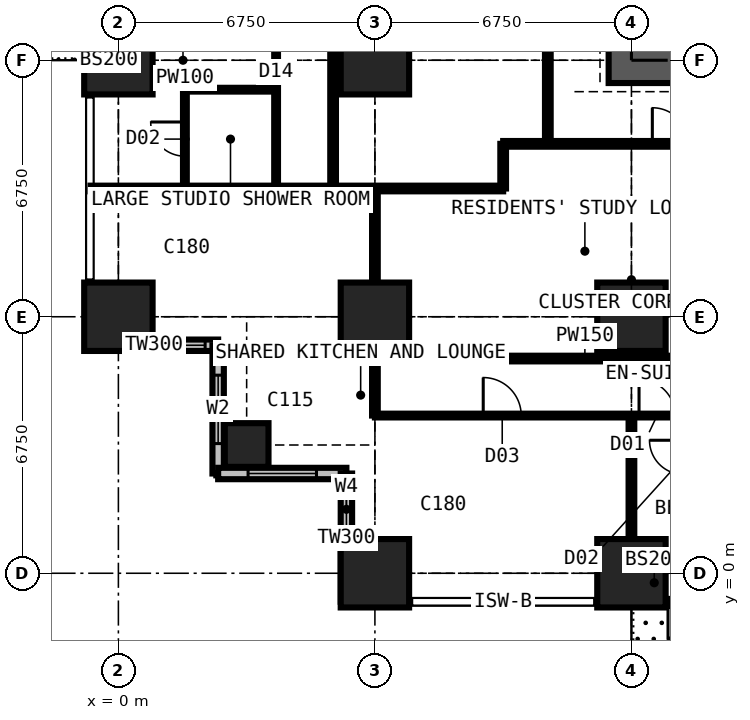
"""IFC4 building model, lengths in metres.
Left out: names, types, materials, properties, quantities, classifications, styles, units other than length and angle.
Written with IfcOpenShell. Run it as: python <this file> out.ifc"""

import sys

from ifc_helpers import new_model, si_unit, direction, frame, frame_2d, origin, origin_2d, place, context, subcontext, project, spatial, rectangle, extrude, element, fill, save


model = new_model("IFC4")
c1 = context("Model", 3, precision=1e-05, world=origin(), true_north=direction((0.0, 1.0)))
c2 = subcontext(c1, "Body", "Model", "MODEL_VIEW")
j1 = project(units=[si_unit("LENGTHUNIT", "METRE"), si_unit("PLANEANGLEUNIT", "RADIAN")], contexts=[c1])
p1 = place(None, origin())
s1 = spatial("IfcSite", under=j1, at=p1, CompositionType="ELEMENT")
p2 = place(p1, origin())
s2 = spatial("IfcBuilding", under=s1, at=p2, CompositionType="ELEMENT")
p3 = place(p2, frame((0.0, 0.0, 101.7)))
s3 = spatial("IfcBuildingStorey", under=s2, at=p3, CompositionType="ELEMENT", Elevation=101.7)
for number, where, z_axis, x_axis in (
    (1, (0.0, 6.75, 0.0), (0.0, 0.0, 1.0), (1.0, 0.0, 0.0)),
    (2, (0.0, 13.5, 0.0), (0.0, 0.0, 1.0), (1.0, 0.0, 0.0)),
):
    element("IfcColumn", number, at=place(p3, frame(where, z_axis=z_axis, x_axis=x_axis)), inside=s3, PredefinedType="COLUMN", context=c2, shape_type="SweptSolid", body=[
        extrude(rectangle(XDim=1.8, YDim=1.8, at=origin_2d()), origin(), (0.0, 0.0, 1.0), 3.6),
    ])
p4 = place(p3, frame((3.375, 3.375, 0.0), z_axis=(0.0, 0.0, 1.0), x_axis=(1.0, 0.0, 0.0)))
e3 = element("IfcColumn", 3, at=p4, inside=s3, PredefinedType="COLUMN", context=c2, shape_type="SweptSolid", body=[
    extrude(rectangle(XDim=1.15, YDim=1.15, at=origin_2d()), origin(), (0.0, 0.0, 1.0), 3.6),
])
for number, where, z_axis, x_axis in (
    (4, (6.75, 0.0, 0.0), (0.0, 0.0, 1.0), (1.0, 0.0, 0.0)),
    (5, (6.75, 6.75, 0.0), (0.0, 0.0, 1.0), (1.0, 0.0, 0.0)),
    (6, (6.75, 13.5, 0.0), (0.0, 0.0, 1.0), (1.0, 0.0, 0.0)),
    (7, (13.5, 0.0, 0.0), (0.0, 0.0, 1.0), (1.0, 0.0, 0.0)),
    (8, (13.5, 6.75, 0.0), (0.0, 0.0, 1.0), (1.0, 0.0, 0.0)),
):
    element("IfcColumn", number, at=place(p3, frame(where, z_axis=z_axis, x_axis=x_axis)), inside=s3, PredefinedType="COLUMN", context=c2, shape_type="SweptSolid", body=[
        extrude(rectangle(XDim=1.8, YDim=1.8, at=origin_2d()), origin(), (0.0, 0.0, 1.0), 3.6),
    ])
p5 = place(p3, frame((12.9, 13.5, 0.0), z_axis=(0.0, 0.0, 1.0), x_axis=(1.0, 0.0, 0.0)))
e9 = element("IfcWall", 9, at=p5, inside=s3, PredefinedType="SHEAR", context=c2, shape_type="SweptSolid", body=[
    extrude(rectangle(XDim=14.7, YDim=1.2, at=frame_2d((7.35, 0.0))), origin(), (0.0, 0.0, 1.0), 3.6),
])
p6 = place(p3, frame((-0.75, 13.5, 0.0), z_axis=(0.0, 0.0, 1.0), x_axis=(0.0, 1.0, 0.0)))
e10 = element("IfcWall", 10, at=p6, inside=s3, PredefinedType="SOLIDWALL", context=c2, shape_type="SweptSolid", body=[
    extrude(rectangle(XDim=6.75, YDim=0.15, at=frame_2d((3.375, 0.0))), origin(), (0.0, 0.0, 1.0), 3.375),
])
p7 = place(p6, frame((0.962, 0.0, 0.0)))
e11 = element("IfcOpeningElement", 11, at=p7, cuts=e10, PredefinedType="OPENING", context=c2, shape_type="SweptSolid", body=[
    extrude(rectangle(XDim=1.0, YDim=2.2, at=frame_2d((0.5, 1.1))), frame((0.0, 0.085, 0.0), z_axis=(0.0, -1.0, 0.0), x_axis=(1.0, 0.0, 0.0)), (0.0, 0.0, 1.0), 0.17),
])
p8 = place(p6, frame((2.025, 0.0, 0.9)))
e12 = element("IfcOpeningElement", 12, at=p8, cuts=e10, PredefinedType="OPENING", context=c2, shape_type="SweptSolid", body=[
    extrude(rectangle(XDim=1.2, YDim=1.8, at=frame_2d((0.6, 0.9))), frame((0.0, 0.085, 0.0), z_axis=(0.0, -1.0, 0.0), x_axis=(1.0, 0.0, 0.0)), (0.0, 0.0, 1.0), 0.17),
])
p9 = place(p6, frame((4.788, 0.0, 0.0)))
e13 = element("IfcOpeningElement", 13, at=p9, cuts=e10, PredefinedType="OPENING", context=c2, shape_type="SweptSolid", body=[
    extrude(rectangle(XDim=1.0, YDim=2.2, at=frame_2d((0.5, 1.1))), frame((0.0, 0.085, 0.0), z_axis=(0.0, -1.0, 0.0), x_axis=(1.0, 0.0, 0.0)), (0.0, 0.0, 1.0), 0.17),
])
p10 = place(p6, frame((3.525, 0.0, 0.9)))
e14 = element("IfcOpeningElement", 14, at=p10, cuts=e10, PredefinedType="OPENING", context=c2, shape_type="SweptSolid", body=[
    extrude(rectangle(XDim=1.2, YDim=1.8, at=frame_2d((0.6, 0.9))), frame((0.0, 0.085, 0.0), z_axis=(0.0, -1.0, 0.0), x_axis=(1.0, 0.0, 0.0)), (0.0, 0.0, 1.0), 0.17),
])
p11 = place(p3, frame((-0.75, 6.0, 0.0), z_axis=(0.0, 0.0, 1.0), x_axis=(1.0, 0.0, 0.0)))
e15 = element("IfcWall", 15, at=p11, inside=s3, PredefinedType="SOLIDWALL", context=c2, shape_type="SweptSolid", body=[
    extrude(rectangle(XDim=3.375, YDim=0.3, at=frame_2d((1.688, 0.0))), origin(), (0.0, 0.0, 1.0), 3.375),
])
p12 = place(p11, frame((1.833, 0.0, 0.9)))
e16 = element("IfcOpeningElement", 16, at=p12, cuts=e15, PredefinedType="OPENING", context=c2, shape_type="SweptSolid", body=[
    extrude(rectangle(XDim=1.2, YDim=1.8, at=frame_2d((0.6, 0.9))), frame((0.0, 0.16, 0.0), z_axis=(0.0, -1.0, 0.0), x_axis=(1.0, 0.0, 0.0)), (0.0, 0.0, 1.0), 0.32),
])
p13 = place(p3, frame((2.625, 6.0, 0.0), z_axis=(0.0, 0.0, 1.0), x_axis=(0.0, -1.0, 0.0)))
e17 = element("IfcWall", 17, at=p13, inside=s3, PredefinedType="SOLIDWALL", context=c2, shape_type="SweptSolid", body=[
    extrude(rectangle(XDim=3.375, YDim=0.3, at=frame_2d((1.688, 0.0))), origin(), (0.0, 0.0, 1.0), 3.375),
])
p14 = place(p13, frame((0.788, 0.0, 0.6)))
e18 = element("IfcOpeningElement", 18, at=p14, cuts=e17, PredefinedType="OPENING", context=c2, shape_type="SweptSolid", body=[
    extrude(rectangle(XDim=1.8, YDim=2.1, at=frame_2d((0.9, 1.05))), frame((0.0, 0.16, 0.0), z_axis=(0.0, -1.0, 0.0), x_axis=(1.0, 0.0, 0.0)), (0.0, 0.0, 1.0), 0.32),
])
p15 = place(p3, frame((2.625, 2.625, 0.0), z_axis=(0.0, 0.0, 1.0), x_axis=(1.0, 0.0, 0.0)))
e19 = element("IfcWall", 19, at=p15, inside=s3, PredefinedType="SOLIDWALL", context=c2, shape_type="SweptSolid", body=[
    extrude(rectangle(XDim=3.375, YDim=0.3, at=frame_2d((1.688, 0.0))), origin(), (0.0, 0.0, 1.0), 3.375),
])
p16 = place(p15, frame((0.788, 0.0, 0.6)))
e20 = element("IfcOpeningElement", 20, at=p16, cuts=e19, PredefinedType="OPENING", context=c2, shape_type="SweptSolid", body=[
    extrude(rectangle(XDim=1.8, YDim=2.1, at=frame_2d((0.9, 1.05))), frame((0.0, 0.16, 0.0), z_axis=(0.0, -1.0, 0.0), x_axis=(1.0, 0.0, 0.0)), (0.0, 0.0, 1.0), 0.32),
])
p17 = place(p3, frame((6.0, 2.625, 0.0), z_axis=(0.0, 0.0, 1.0), x_axis=(0.0, -1.0, 0.0)))
e21 = element("IfcWall", 21, at=p17, inside=s3, PredefinedType="SOLIDWALL", context=c2, shape_type="SweptSolid", body=[
    extrude(rectangle(XDim=3.375, YDim=0.3, at=frame_2d((1.688, 0.0))), origin(), (0.0, 0.0, 1.0), 3.375),
])
p18 = place(p17, frame((0.343, 0.0, 0.9)))
e22 = element("IfcOpeningElement", 22, at=p18, cuts=e21, PredefinedType="OPENING", context=c2, shape_type="SweptSolid", body=[
    extrude(rectangle(XDim=1.2, YDim=1.8, at=frame_2d((0.6, 0.9))), frame((0.0, 0.16, 0.0), z_axis=(0.0, -1.0, 0.0), x_axis=(1.0, 0.0, 0.0)), (0.0, 0.0, 1.0), 0.32),
])
p19 = place(p3, frame((20.25, -0.75, 0.0), z_axis=(0.0, 0.0, 1.0), x_axis=(-1.0, 0.0, 0.0)))
e23 = element("IfcWall", 23, at=p19, inside=s3, PredefinedType="SOLIDWALL", context=c2, shape_type="SweptSolid", body=[
    extrude(rectangle(XDim=6.75, YDim=0.15, at=frame_2d((3.375, 0.0))), origin(), (0.0, 0.0, 1.0), 3.375),
])
p20 = place(p19, frame((0.962, 0.0, 0.0)))
e24 = element("IfcOpeningElement", 24, at=p20, cuts=e23, PredefinedType="OPENING", context=c2, shape_type="SweptSolid", body=[
    extrude(rectangle(XDim=1.0, YDim=2.2, at=frame_2d((0.5, 1.1))), frame((0.0, 0.085, 0.0), z_axis=(0.0, -1.0, 0.0), x_axis=(1.0, 0.0, 0.0)), (0.0, 0.0, 1.0), 0.17),
])
p21 = place(p19, frame((2.025, 0.0, 0.9)))
e25 = element("IfcOpeningElement", 25, at=p21, cuts=e23, PredefinedType="OPENING", context=c2, shape_type="SweptSolid", body=[
    extrude(rectangle(XDim=1.2, YDim=1.8, at=frame_2d((0.6, 0.9))), frame((0.0, 0.085, 0.0), z_axis=(0.0, -1.0, 0.0), x_axis=(1.0, 0.0, 0.0)), (0.0, 0.0, 1.0), 0.17),
])
p22 = place(p19, frame((4.788, 0.0, 0.0)))
e26 = element("IfcOpeningElement", 26, at=p22, cuts=e23, PredefinedType="OPENING", context=c2, shape_type="SweptSolid", body=[
    extrude(rectangle(XDim=1.0, YDim=2.2, at=frame_2d((0.5, 1.1))), frame((0.0, 0.085, 0.0), z_axis=(0.0, -1.0, 0.0), x_axis=(1.0, 0.0, 0.0)), (0.0, 0.0, 1.0), 0.17),
])
p23 = place(p19, frame((3.525, 0.0, 0.9)))
e27 = element("IfcOpeningElement", 27, at=p23, cuts=e23, PredefinedType="OPENING", context=c2, shape_type="SweptSolid", body=[
    extrude(rectangle(XDim=1.2, YDim=1.8, at=frame_2d((0.6, 0.9))), frame((0.0, 0.085, 0.0), z_axis=(0.0, -1.0, 0.0), x_axis=(1.0, 0.0, 0.0)), (0.0, 0.0, 1.0), 0.17),
])
p24 = place(p3, frame((-0.734, 10.125, 0.0), z_axis=(0.0, 0.0, 1.0), x_axis=(1.0, 0.0, 0.0)))
e28 = element("IfcWall", 28, at=p24, inside=s3, PredefinedType="PARTITIONING", context=c2, shape_type="SweptSolid", body=[
    extrude(rectangle(XDim=10.859, YDim=0.15, at=frame_2d((5.429, 0.0))), origin(), (0.0, 0.0, 1.0), 3.375),
])
p25 = place(p3, frame((1.75, 10.125, 0.0), z_axis=(0.0, 0.0, 1.0), x_axis=(0.0, 1.0, 0.0)))
e29 = element("IfcWall", 29, at=p25, inside=s3, PredefinedType="PARTITIONING", context=c2, shape_type="SweptSolid", body=[
    extrude(rectangle(XDim=2.6, YDim=0.1, at=frame_2d((1.3, 0.0))), origin(), (0.0, 0.0, 1.0), 3.375),
])
p26 = place(p25, frame((0.85, 0.0, 0.0)))
e30 = element("IfcOpeningElement", 30, at=p26, cuts=e29, PredefinedType="OPENING", context=c2, shape_type="SweptSolid", body=[
    extrude(rectangle(XDim=0.9, YDim=2.2, at=frame_2d((0.45, 1.1))), frame((0.0, 0.06, 0.0), z_axis=(0.0, -1.0, 0.0), x_axis=(1.0, 0.0, 0.0)), (0.0, 0.0, 1.0), 0.12),
])
p27 = place(p3, frame((1.75, 12.725, 0.0), z_axis=(0.0, 0.0, 1.0), x_axis=(1.0, 0.0, 0.0)))
e31 = element("IfcWall", 31, at=p27, inside=s3, PredefinedType="PARTITIONING", context=c2, shape_type="SweptSolid", body=[
    extrude(rectangle(XDim=2.4, YDim=0.1, at=frame_2d((1.2, 0.0))), origin(), (0.0, 0.0, 1.0), 3.375),
])
p28 = place(p3, frame((4.15, 10.125, 0.0), z_axis=(0.0, 0.0, 1.0), x_axis=(0.0, 1.0, 0.0)))
e32 = element("IfcWall", 32, at=p28, inside=s3, PredefinedType="PARTITIONING", context=c2, shape_type="SweptSolid", body=[
    extrude(rectangle(XDim=16.875, YDim=0.1, at=frame_2d((8.438, 0.0))), origin(), (0.0, 0.0, 1.0), 3.375),
])
p29 = place(p28, frame((13.7, 0.0, 0.0)))
e33 = element("IfcOpeningElement", 33, at=p29, cuts=e32, PredefinedType="OPENING", context=c2, shape_type="SweptSolid", body=[
    extrude(rectangle(XDim=0.95, YDim=2.2, at=frame_2d((0.475, 1.1))), frame((0.0, 0.06, 0.0), z_axis=(0.0, -1.0, 0.0), x_axis=(1.0, 0.0, 0.0)), (0.0, 0.0, 1.0), 0.12),
])
p30 = place(p28, frame((4.2, 0.0, 0.0)))
e34 = element("IfcOpeningElement", 34, at=p30, cuts=e32, PredefinedType="OPENING", context=c2, shape_type="SweptSolid", body=[
    extrude(rectangle(XDim=0.95, YDim=2.2, at=frame_2d((0.475, 1.1))), frame((0.0, 0.06, 0.0), z_axis=(0.0, -1.0, 0.0), x_axis=(1.0, 0.0, 0.0)), (0.0, 0.0, 1.0), 0.12),
])
p31 = place(p28, frame((10.95, 0.0, 0.0)))
e35 = element("IfcOpeningElement", 35, at=p31, cuts=e32, PredefinedType="OPENING", context=c2, shape_type="SweptSolid", body=[
    extrude(rectangle(XDim=0.95, YDim=2.2, at=frame_2d((0.475, 1.1))), frame((0.0, 0.06, 0.0), z_axis=(0.0, -1.0, 0.0), x_axis=(1.0, 0.0, 0.0)), (0.0, 0.0, 1.0), 0.12),
])
p32 = place(p3, frame((5.65, 10.125, 0.0), z_axis=(0.0, 0.0, 1.0), x_axis=(0.0, 1.0, 0.0)))
e36 = element("IfcWall", 36, at=p32, inside=s3, PredefinedType="PARTITIONING", context=c2, shape_type="SweptSolid", body=[
    extrude(rectangle(XDim=10.762, YDim=0.15, at=frame_2d((5.381, 0.0))), origin(), (0.0, 0.0, 1.0), 3.375),
])
p33 = place(p32, frame((4.9, 0.0, 0.0)))
e37 = element("IfcOpeningElement", 37, at=p33, cuts=e36, PredefinedType="OPENING", context=c2, shape_type="SweptSolid", body=[
    extrude(rectangle(XDim=0.95, YDim=2.2, at=frame_2d((0.475, 1.1))), frame((0.0, 0.085, 0.0), z_axis=(0.0, -1.0, 0.0), x_axis=(1.0, 0.0, 0.0)), (0.0, 0.0, 1.0), 0.17),
])
p34 = place(p3, frame((6.75, 4.15, 0.0), z_axis=(0.0, 0.0, 1.0), x_axis=(0.0, 1.0, 0.0)))
e38 = element("IfcWall", 38, at=p34, inside=s3, PredefinedType="PARTITIONING", context=c2, shape_type="SweptSolid", body=[
    extrude(rectangle(XDim=5.975, YDim=0.15, at=frame_2d((2.988, 0.0))), origin(), (0.0, 0.0, 1.0), 2.877),
])
p35 = place(p3, frame((6.75, 4.15, 0.0), z_axis=(0.0, 0.0, 1.0), x_axis=(1.0, 0.0, 0.0)))
e39 = element("IfcWall", 39, at=p35, inside=s3, PredefinedType="PARTITIONING", context=c2, shape_type="SweptSolid", body=[
    extrude(rectangle(XDim=23.625, YDim=0.1, at=frame_2d((11.812, 0.0))), origin(), (0.0, 0.0, 1.0), 3.375),
])
p36 = place(p35, frame((2.85, 0.0, 0.0)))
e40 = element("IfcOpeningElement", 40, at=p36, cuts=e39, PredefinedType="OPENING", context=c2, shape_type="SweptSolid", body=[
    extrude(rectangle(XDim=1.0, YDim=2.2, at=frame_2d((0.5, 1.1))), frame((0.0, 0.06, 0.0), z_axis=(0.0, -1.0, 0.0), x_axis=(1.0, 0.0, 0.0)), (0.0, 0.0, 1.0), 0.12),
])
p37 = place(p35, frame((6.95, 0.0, 0.0)))
e41 = element("IfcOpeningElement", 41, at=p37, cuts=e39, PredefinedType="OPENING", context=c2, shape_type="SweptSolid", body=[
    extrude(rectangle(XDim=0.95, YDim=2.2, at=frame_2d((0.475, 1.1))), frame((0.0, 0.06, 0.0), z_axis=(0.0, -1.0, 0.0), x_axis=(1.0, 0.0, 0.0)), (0.0, 0.0, 1.0), 0.12),
])
p38 = place(p35, frame((10.375, 0.0, 0.0)))
e42 = element("IfcOpeningElement", 42, at=p38, cuts=e39, PredefinedType="OPENING", context=c2, shape_type="SweptSolid", body=[
    extrude(rectangle(XDim=0.95, YDim=2.2, at=frame_2d((0.475, 1.1))), frame((0.0, 0.06, 0.0), z_axis=(0.0, -1.0, 0.0), x_axis=(1.0, 0.0, 0.0)), (0.0, 0.0, 1.0), 0.12),
])
p39 = place(p35, frame((18.475, 0.0, 0.0)))
e43 = element("IfcOpeningElement", 43, at=p39, cuts=e39, PredefinedType="OPENING", context=c2, shape_type="SweptSolid", body=[
    extrude(rectangle(XDim=0.95, YDim=2.2, at=frame_2d((0.475, 1.1))), frame((0.0, 0.06, 0.0), z_axis=(0.0, -1.0, 0.0), x_axis=(1.0, 0.0, 0.0)), (0.0, 0.0, 1.0), 0.12),
])
p40 = place(p35, frame((13.7, 0.0, 0.0)))
e44 = element("IfcOpeningElement", 44, at=p40, cuts=e39, PredefinedType="OPENING", context=c2, shape_type="SweptSolid", body=[
    extrude(rectangle(XDim=0.95, YDim=2.2, at=frame_2d((0.475, 1.1))), frame((0.0, 0.06, 0.0), z_axis=(0.0, -1.0, 0.0), x_axis=(1.0, 0.0, 0.0)), (0.0, 0.0, 1.0), 0.12),
])
p41 = place(p3, frame((6.75, 5.65, 0.0), z_axis=(0.0, 0.0, 1.0), x_axis=(1.0, 0.0, 0.0)))
e45 = element("IfcWall", 45, at=p41, inside=s3, PredefinedType="PARTITIONING", context=c2, shape_type="SweptSolid", body=[
    extrude(rectangle(XDim=11.05, YDim=0.15, at=frame_2d((5.525, 0.0))), origin(), (0.0, 0.0, 1.0), 3.375),
])
p42 = place(p3, frame((10.125, 10.125, 0.0), z_axis=(0.0, 0.0, 1.0), x_axis=(0.0, 1.0, 0.0)))
e46 = element("IfcWall", 46, at=p42, inside=s3, PredefinedType="PARTITIONING", context=c2, shape_type="SweptSolid", body=[
    extrude(rectangle(XDim=1.175, YDim=0.15, at=frame_2d((0.587, 0.0))), origin(), (0.0, 0.0, 1.0), 3.375),
])
p43 = place(p3, frame((10.125, 11.3, 0.0), z_axis=(0.0, 0.0, 1.0), x_axis=(1.0, 0.0, 0.0)))
e47 = element("IfcWall", 47, at=p43, inside=s3, PredefinedType="PARTITIONING", context=c2, shape_type="SweptSolid", body=[
    extrude(rectangle(XDim=20.675, YDim=0.15, at=frame_2d((10.337, 0.0))), origin(), (0.0, 0.0, 1.0), 3.375),
])
p44 = place(p43, frame((8.375, 0.0, 0.0)))
e48 = element("IfcOpeningElement", 48, at=p44, cuts=e47, PredefinedType="OPENING", context=c2, shape_type="SweptSolid", body=[
    extrude(rectangle(XDim=1.0, YDim=2.2, at=frame_2d((0.5, 1.1))), frame((0.0, 0.085, 0.0), z_axis=(0.0, -1.0, 0.0), x_axis=(1.0, 0.0, 0.0)), (0.0, 0.0, 1.0), 0.17),
])
p45 = place(p43, frame((10.975, 0.0, 0.0)))
e49 = element("IfcOpeningElement", 49, at=p45, cuts=e47, PredefinedType="OPENING", context=c2, shape_type="SweptSolid", body=[
    extrude(rectangle(XDim=1.0, YDim=2.2, at=frame_2d((0.5, 1.1))), frame((0.0, 0.085, 0.0), z_axis=(0.0, -1.0, 0.0), x_axis=(1.0, 0.0, 0.0)), (0.0, 0.0, 1.0), 0.17),
])
p46 = place(p43, frame((3.925, 0.0, 0.0)))
e50 = element("IfcOpeningElement", 50, at=p46, cuts=e47, PredefinedType="OPENING", context=c2, shape_type="SweptSolid", body=[
    extrude(rectangle(XDim=0.95, YDim=2.2, at=frame_2d((0.475, 1.1))), frame((0.0, 0.085, 0.0), z_axis=(0.0, -1.0, 0.0), x_axis=(1.0, 0.0, 0.0)), (0.0, 0.0, 1.0), 0.17),
])
p47 = place(p3, frame((11.3, 11.3, 0.0), z_axis=(0.0, 0.0, 1.0), x_axis=(0.0, 1.0, 0.0)))
e51 = element("IfcWall", 51, at=p47, inside=s3, PredefinedType="PARTITIONING", context=c2, shape_type="SweptSolid", body=[
    extrude(rectangle(XDim=19.3, YDim=0.15, at=frame_2d((9.65, 0.0))), origin(), (0.0, 0.0, 1.0), 3.375),
])
p48 = place(p47, frame((13.525, 0.0, 0.0)))
e52 = element("IfcOpeningElement", 52, at=p48, cuts=e51, PredefinedType="OPENING", context=c2, shape_type="SweptSolid", body=[
    extrude(rectangle(XDim=1.0, YDim=2.2, at=frame_2d((0.5, 1.1))), frame((0.0, 0.085, 0.0), z_axis=(0.0, -1.0, 0.0), x_axis=(1.0, 0.0, 0.0)), (0.0, 0.0, 1.0), 0.17),
])
p49 = place(p47, frame((10.438, 0.0, 0.0)))
e53 = element("IfcOpeningElement", 53, at=p49, cuts=e51, PredefinedType="OPENING", context=c2, shape_type="SweptSolid", body=[
    extrude(rectangle(XDim=1.0, YDim=2.2, at=frame_2d((0.5, 1.1))), frame((0.0, 0.085, 0.0), z_axis=(0.0, -1.0, 0.0), x_axis=(1.0, 0.0, 0.0)), (0.0, 0.0, 1.0), 0.17),
])
p50 = place(p3, frame((13.5, -0.734, 0.0), z_axis=(0.0, 0.0, 1.0), x_axis=(0.0, 1.0, 0.0)))
e54 = element("IfcWall", 54, at=p50, inside=s3, PredefinedType="PARTITIONING", context=c2, shape_type="SweptSolid", body=[
    extrude(rectangle(XDim=4.884, YDim=0.15, at=frame_2d((2.442, 0.0))), origin(), (0.0, 0.0, 1.0), 2.877),
])
p51 = place(p12, origin())
e55 = element("IfcWindow", 55, at=p51, inside=s3, PartitioningType="SINGLE_PANEL", PredefinedType="WINDOW", context=c2, shape_type="SweptSolid", body=[
    extrude(rectangle(XDim=1.2, YDim=1.8, at=frame_2d((0.6, 0.9))), frame((0.0, 0.03, 0.0), z_axis=(0.0, -1.0, 0.0), x_axis=(1.0, 0.0, 0.0)), (0.0, 0.0, 1.0), 0.06),
])
fill(e16, e55)
p52 = place(p14, origin())
e56 = element("IfcWindow", 56, at=p52, inside=s3, PartitioningType="SINGLE_PANEL", PredefinedType="WINDOW", context=c2, shape_type="SweptSolid", body=[
    extrude(rectangle(XDim=1.8, YDim=2.1, at=frame_2d((0.9, 1.05))), frame((0.0, 0.03, 0.0), z_axis=(0.0, -1.0, 0.0), x_axis=(1.0, 0.0, 0.0)), (0.0, 0.0, 1.0), 0.06),
])
fill(e18, e56)
p53 = place(p16, origin())
e57 = element("IfcWindow", 57, at=p53, inside=s3, PartitioningType="SINGLE_PANEL", PredefinedType="WINDOW", context=c2, shape_type="SweptSolid", body=[
    extrude(rectangle(XDim=1.8, YDim=2.1, at=frame_2d((0.9, 1.05))), frame((0.0, 0.03, 0.0), z_axis=(0.0, -1.0, 0.0), x_axis=(1.0, 0.0, 0.0)), (0.0, 0.0, 1.0), 0.06),
])
fill(e20, e57)
p54 = place(p18, origin())
e58 = element("IfcWindow", 58, at=p54, inside=s3, PartitioningType="SINGLE_PANEL", PredefinedType="WINDOW", context=c2, shape_type="SweptSolid", body=[
    extrude(rectangle(XDim=1.2, YDim=1.8, at=frame_2d((0.6, 0.9))), frame((0.0, 0.03, 0.0), z_axis=(0.0, -1.0, 0.0), x_axis=(1.0, 0.0, 0.0)), (0.0, 0.0, 1.0), 0.06),
])
fill(e22, e58)
p55 = place(p22, origin())
e59 = element("IfcDoor", 59, at=p55, inside=s3, OperationType="SINGLE_SWING_RIGHT", PredefinedType="DOOR", context=c2, shape_type="SweptSolid", body=[
    extrude(rectangle(XDim=1.0, YDim=2.2, at=frame_2d((0.5, 1.1))), frame((0.0, 0.025, 0.0), z_axis=(0.0, -1.0, 0.0), x_axis=(1.0, 0.0, 0.0)), (0.0, 0.0, 1.0), 0.05),
])
fill(e26, e59)
p56 = place(p36, origin())
e60 = element("IfcDoor", 60, at=p56, inside=s3, OperationType="SINGLE_SWING_LEFT", PredefinedType="DOOR", context=c2, shape_type="SweptSolid", body=[
    extrude(rectangle(XDim=1.0, YDim=2.2, at=frame_2d((0.5, 1.1))), frame((0.0, 0.025, 0.0), z_axis=(0.0, -1.0, 0.0), x_axis=(1.0, 0.0, 0.0)), (0.0, 0.0, 1.0), 0.05),
])
fill(e40, e60)
p57 = place(p37, origin())
e61 = element("IfcDoor", 61, at=p57, inside=s3, OperationType="SINGLE_SWING_LEFT", PredefinedType="DOOR", context=c2, shape_type="SweptSolid", body=[
    extrude(rectangle(XDim=0.95, YDim=2.2, at=frame_2d((0.475, 1.1))), frame((0.0, 0.025, 0.0), z_axis=(0.0, -1.0, 0.0), x_axis=(1.0, 0.0, 0.0)), (0.0, 0.0, 1.0), 0.05),
])
fill(e41, e61)
p58 = place(p46, origin())
e62 = element("IfcDoor", 62, at=p58, inside=s3, OperationType="SINGLE_SWING_LEFT", PredefinedType="DOOR", context=c2, shape_type="SweptSolid", body=[
    extrude(rectangle(XDim=0.95, YDim=2.2, at=frame_2d((0.475, 1.1))), frame((0.0, 0.025, 0.0), z_axis=(0.0, -1.0, 0.0), x_axis=(1.0, 0.0, 0.0)), (0.0, 0.0, 1.0), 0.05),
])
fill(e50, e62)
p59 = place(p26, origin())
e63 = element("IfcDoor", 63, at=p59, inside=s3, OperationType="SINGLE_SWING_RIGHT", PredefinedType="DOOR", context=c2, shape_type="SweptSolid", body=[
    extrude(rectangle(XDim=0.9, YDim=2.2, at=frame_2d((0.45, 1.1))), frame((0.0, 0.025, 0.0), z_axis=(0.0, -1.0, 0.0), x_axis=(1.0, 0.0, 0.0)), (0.0, 0.0, 1.0), 0.05),
])
fill(e30, e63)
save(model, sys.argv[1])
